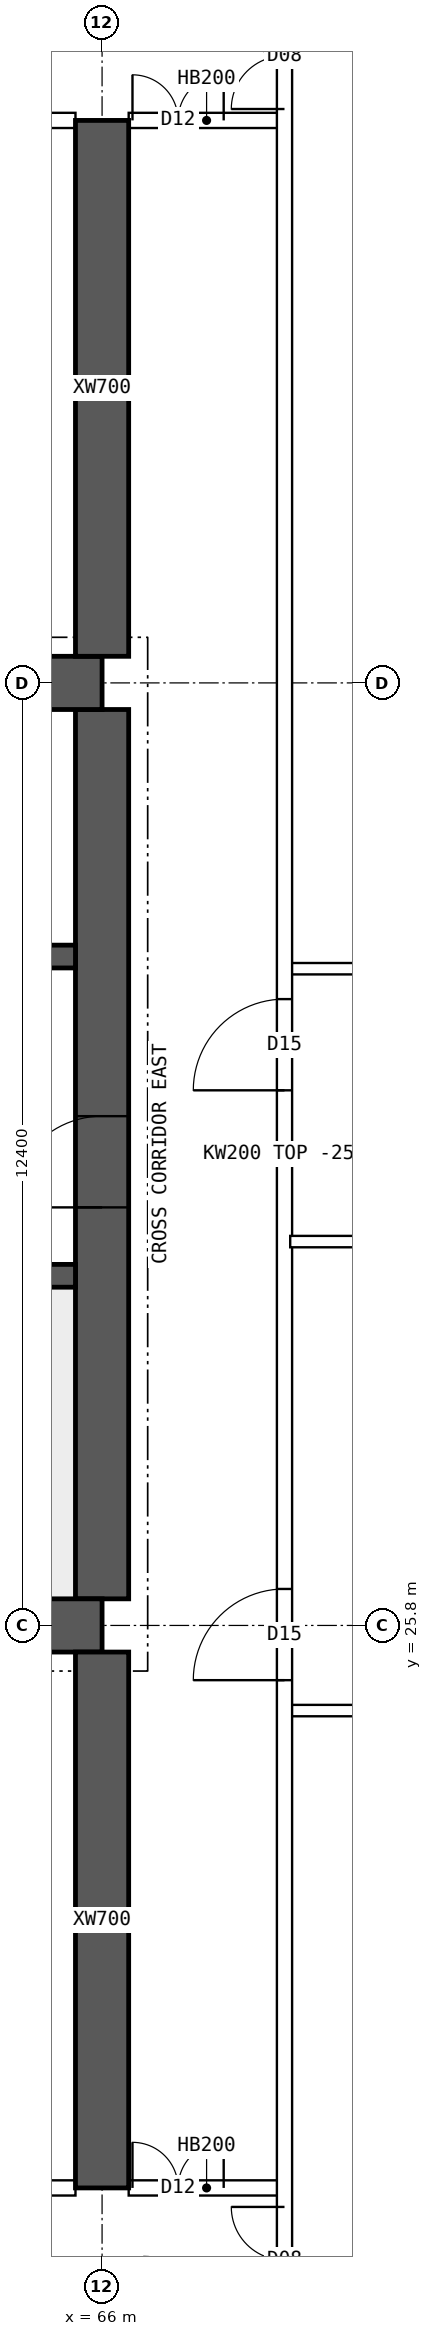
"""IFC4 building model, lengths in metres.
Left out: names, types, materials, properties, quantities, classifications, styles, units other than length and angle.
Written with IfcOpenShell. Run it as: python <this file> out.ifc"""

import sys

from ifc_helpers import new_model, si_unit, direction, frame, frame_2d, origin, place, context, subcontext, project, spatial, polyline, rectangle, outline, extrude, element, fill, save


model = new_model("IFC4")
c1 = context("Model", 3, precision=1e-05, world=origin(), true_north=direction((0.0, 1.0)))
c2 = subcontext(c1, "Body", "Model", "MODEL_VIEW")
j1 = project(units=[si_unit("LENGTHUNIT", "METRE"), si_unit("PLANEANGLEUNIT", "RADIAN")], contexts=[c1])
p1 = place(None, origin())
s1 = spatial("IfcSite", under=j1, at=p1, CompositionType="ELEMENT")
p2 = place(p1, origin())
s2 = spatial("IfcBuilding", under=s1, at=p2, CompositionType="ELEMENT")
p3 = place(p2, frame((0.0, 0.0, 231.55)))
s3 = spatial("IfcBuildingStorey", under=s2, at=p3, CompositionType="ELEMENT", Elevation=231.55)
for number, where, z_axis, x_axis in (
    (1, (18.0, 25.8, 0.0), (0.0, 0.0, 1.0), (1.0, 0.0, 0.0)),
    (2, (18.0, 38.2, 0.0), (0.0, 0.0, 1.0), (1.0, 0.0, 0.0)),
):
    element("IfcWall", number, at=place(p3, frame(where, z_axis=z_axis, x_axis=x_axis)), inside=s3, PredefinedType="SHEAR", context=c2, shape_type="SweptSolid", body=[
        extrude(rectangle(XDim=48.0, YDim=0.7, at=frame_2d((24.0, 0.0))), origin(), (0.0, 0.0, 1.0), 3.75),
    ])
p4 = place(p3, frame((66.0, 26.15, 0.0), z_axis=(0.0, 0.0, 1.0), x_axis=(0.0, 1.0, 0.0)))
e3 = element("IfcWall", 3, at=p4, inside=s3, PredefinedType="SHEAR", context=c2, shape_type="SweptSolid", body=[
    extrude(rectangle(XDim=11.7, YDim=0.7, at=frame_2d((5.85, 0.0))), origin(), (0.0, 0.0, 1.0), 3.75),
])
p5 = place(p4, frame((5.15, 0.0, 0.0)))
e4 = element("IfcOpeningElement", 4, at=p5, cuts=e3, PredefinedType="OPENING", context=c2, shape_type="SweptSolid", body=[
    extrude(rectangle(XDim=1.2, YDim=2.1, at=frame_2d((0.6, 1.05))), frame((0.0, 0.36, 0.0), z_axis=(0.0, -1.0, 0.0), x_axis=(1.0, 0.0, 0.0)), (0.0, 0.0, 1.0), 0.72),
])
p6 = place(p3, frame((18.35, 30.4, 0.0), z_axis=(0.0, 0.0, 1.0), x_axis=(1.0, 0.0, 0.0)))
e5 = element("IfcWall", 5, at=p6, inside=s3, PredefinedType="SHEAR", context=c2, shape_type="SweptSolid", body=[
    extrude(rectangle(XDim=47.3, YDim=0.3, at=frame_2d((23.65, 0.0))), origin(), (0.0, 0.0, 1.0), 3.75),
])
p7 = place(p6, frame((0.4, 0.0, 0.0)))
e6 = element("IfcOpeningElement", 6, at=p7, cuts=e5, PredefinedType="OPENING", context=c2, shape_type="SweptSolid", body=[
    extrude(rectangle(XDim=1.0, YDim=2.1, at=frame_2d((0.5, 1.05))), frame((0.0, 0.16, 0.0), z_axis=(0.0, -1.0, 0.0), x_axis=(1.0, 0.0, 0.0)), (0.0, 0.0, 1.0), 0.32),
])
p8 = place(p6, frame((45.9, 0.0, 0.0)))
e7 = element("IfcOpeningElement", 7, at=p8, cuts=e5, PredefinedType="OPENING", context=c2, shape_type="SweptSolid", body=[
    extrude(rectangle(XDim=1.0, YDim=2.1, at=frame_2d((0.5, 1.05))), frame((0.0, 0.16, 0.0), z_axis=(0.0, -1.0, 0.0), x_axis=(1.0, 0.0, 0.0)), (0.0, 0.0, 1.0), 0.32),
])
p9 = place(p6, frame((8.4, 0.0, 0.0)))
e8 = element("IfcOpeningElement", 8, at=p9, cuts=e5, PredefinedType="OPENING", context=c2, shape_type="SweptSolid", body=[
    extrude(rectangle(XDim=1.1, YDim=2.1, at=frame_2d((0.55, 1.05))), frame((0.0, 0.16, 0.0), z_axis=(0.0, -1.0, 0.0), x_axis=(1.0, 0.0, 0.0)), (0.0, 0.0, 1.0), 0.32),
])
p10 = place(p6, frame((11.0, 0.0, 0.0)))
e9 = element("IfcOpeningElement", 9, at=p10, cuts=e5, PredefinedType="OPENING", context=c2, shape_type="SweptSolid", body=[
    extrude(rectangle(XDim=1.1, YDim=2.1, at=frame_2d((0.55, 1.05))), frame((0.0, 0.16, 0.0), z_axis=(0.0, -1.0, 0.0), x_axis=(1.0, 0.0, 0.0)), (0.0, 0.0, 1.0), 0.32),
])
p11 = place(p6, frame((13.6, 0.0, 0.0)))
e10 = element("IfcOpeningElement", 10, at=p11, cuts=e5, PredefinedType="OPENING", context=c2, shape_type="SweptSolid", body=[
    extrude(rectangle(XDim=1.1, YDim=2.1, at=frame_2d((0.55, 1.05))), frame((0.0, 0.16, 0.0), z_axis=(0.0, -1.0, 0.0), x_axis=(1.0, 0.0, 0.0)), (0.0, 0.0, 1.0), 0.32),
])
p12 = place(p6, frame((16.2, 0.0, 0.0)))
e11 = element("IfcOpeningElement", 11, at=p12, cuts=e5, PredefinedType="OPENING", context=c2, shape_type="SweptSolid", body=[
    extrude(rectangle(XDim=1.1, YDim=2.1, at=frame_2d((0.55, 1.05))), frame((0.0, 0.16, 0.0), z_axis=(0.0, -1.0, 0.0), x_axis=(1.0, 0.0, 0.0)), (0.0, 0.0, 1.0), 0.32),
])
p13 = place(p6, frame((18.975, 0.0, 0.0)))
e12 = element("IfcOpeningElement", 12, at=p13, cuts=e5, PredefinedType="OPENING", context=c2, shape_type="SweptSolid", body=[
    extrude(rectangle(XDim=0.9, YDim=2.1, at=frame_2d((0.45, 1.05))), frame((0.0, 0.16, 0.0), z_axis=(0.0, -1.0, 0.0), x_axis=(1.0, 0.0, 0.0)), (0.0, 0.0, 1.0), 0.32),
])
p14 = place(p6, frame((24.475, 0.0, 0.0)))
e13 = element("IfcOpeningElement", 13, at=p14, cuts=e5, PredefinedType="OPENING", context=c2, shape_type="SweptSolid", body=[
    extrude(rectangle(XDim=0.9, YDim=2.1, at=frame_2d((0.45, 1.05))), frame((0.0, 0.16, 0.0), z_axis=(0.0, -1.0, 0.0), x_axis=(1.0, 0.0, 0.0)), (0.0, 0.0, 1.0), 0.32),
])
p15 = place(p6, frame((30.267, 0.0, 0.0)))
e14 = element("IfcOpeningElement", 14, at=p15, cuts=e5, PredefinedType="OPENING", context=c2, shape_type="SweptSolid", body=[
    extrude(rectangle(XDim=1.1, YDim=2.1, at=frame_2d((0.55, 1.05))), frame((0.0, 0.16, 0.0), z_axis=(0.0, -1.0, 0.0), x_axis=(1.0, 0.0, 0.0)), (0.0, 0.0, 1.0), 0.32),
])
p16 = place(p6, frame((33.8, 0.0, 0.0)))
e15 = element("IfcOpeningElement", 15, at=p16, cuts=e5, PredefinedType="OPENING", context=c2, shape_type="SweptSolid", body=[
    extrude(rectangle(XDim=1.1, YDim=2.1, at=frame_2d((0.55, 1.05))), frame((0.0, 0.16, 0.0), z_axis=(0.0, -1.0, 0.0), x_axis=(1.0, 0.0, 0.0)), (0.0, 0.0, 1.0), 0.32),
])
p17 = place(p6, frame((37.333, 0.0, 0.0)))
e16 = element("IfcOpeningElement", 16, at=p17, cuts=e5, PredefinedType="OPENING", context=c2, shape_type="SweptSolid", body=[
    extrude(rectangle(XDim=1.1, YDim=2.1, at=frame_2d((0.55, 1.05))), frame((0.0, 0.16, 0.0), z_axis=(0.0, -1.0, 0.0), x_axis=(1.0, 0.0, 0.0)), (0.0, 0.0, 1.0), 0.32),
])
p18 = place(p3, frame((18.35, 34.6, 0.0), z_axis=(0.0, 0.0, 1.0), x_axis=(1.0, 0.0, 0.0)))
e17 = element("IfcWall", 17, at=p18, inside=s3, PredefinedType="SHEAR", context=c2, shape_type="SweptSolid", body=[
    extrude(rectangle(XDim=47.3, YDim=0.3, at=frame_2d((23.65, 0.0))), origin(), (0.0, 0.0, 1.0), 3.75),
])
p19 = place(p18, frame((0.9, 0.0, 0.0)))
e18 = element("IfcOpeningElement", 18, at=p19, cuts=e17, PredefinedType="OPENING", context=c2, shape_type="SweptSolid", body=[
    extrude(rectangle(XDim=1.1, YDim=2.1, at=frame_2d((0.55, 1.05))), frame((0.0, 0.16, 0.0), z_axis=(0.0, -1.0, 0.0), x_axis=(1.0, 0.0, 0.0)), (0.0, 0.0, 1.0), 0.32),
])
p20 = place(p18, frame((45.3, 0.0, 0.0)))
e19 = element("IfcOpeningElement", 19, at=p20, cuts=e17, PredefinedType="OPENING", context=c2, shape_type="SweptSolid", body=[
    extrude(rectangle(XDim=1.1, YDim=2.1, at=frame_2d((0.55, 1.05))), frame((0.0, 0.16, 0.0), z_axis=(0.0, -1.0, 0.0), x_axis=(1.0, 0.0, 0.0)), (0.0, 0.0, 1.0), 0.32),
])
p21 = place(p18, frame((4.25, 0.0, 0.0)))
e20 = element("IfcOpeningElement", 20, at=p21, cuts=e17, PredefinedType="OPENING", context=c2, shape_type="SweptSolid", body=[
    extrude(rectangle(XDim=0.9, YDim=2.1, at=frame_2d((0.45, 1.05))), frame((0.0, 0.16, 0.0), z_axis=(0.0, -1.0, 0.0), x_axis=(1.0, 0.0, 0.0)), (0.0, 0.0, 1.0), 0.32),
])
p22 = place(p18, frame((42.15, 0.0, 0.0)))
e21 = element("IfcOpeningElement", 21, at=p22, cuts=e17, PredefinedType="OPENING", context=c2, shape_type="SweptSolid", body=[
    extrude(rectangle(XDim=0.9, YDim=2.1, at=frame_2d((0.45, 1.05))), frame((0.0, 0.16, 0.0), z_axis=(0.0, -1.0, 0.0), x_axis=(1.0, 0.0, 0.0)), (0.0, 0.0, 1.0), 0.32),
])
p23 = place(p18, frame((9.025, 0.0, 0.0)))
e22 = element("IfcOpeningElement", 22, at=p23, cuts=e17, PredefinedType="OPENING", context=c2, shape_type="SweptSolid", body=[
    extrude(rectangle(XDim=0.9, YDim=2.1, at=frame_2d((0.45, 1.05))), frame((0.0, 0.16, 0.0), z_axis=(0.0, -1.0, 0.0), x_axis=(1.0, 0.0, 0.0)), (0.0, 0.0, 1.0), 0.32),
])
p24 = place(p18, frame((12.999, 0.0, 0.0)))
e23 = element("IfcOpeningElement", 23, at=p24, cuts=e17, PredefinedType="OPENING", context=c2, shape_type="SweptSolid", body=[
    extrude(rectangle(XDim=0.9, YDim=2.1, at=frame_2d((0.45, 1.05))), frame((0.0, 0.16, 0.0), z_axis=(0.0, -1.0, 0.0), x_axis=(1.0, 0.0, 0.0)), (0.0, 0.0, 1.0), 0.32),
])
p25 = place(p18, frame((16.646, 0.0, 0.0)))
e24 = element("IfcOpeningElement", 24, at=p25, cuts=e17, PredefinedType="OPENING", context=c2, shape_type="SweptSolid", body=[
    extrude(rectangle(XDim=0.9, YDim=2.1, at=frame_2d((0.45, 1.05))), frame((0.0, 0.16, 0.0), z_axis=(0.0, -1.0, 0.0), x_axis=(1.0, 0.0, 0.0)), (0.0, 0.0, 1.0), 0.32),
])
p26 = place(p18, frame((20.405, 0.0, 0.0)))
e25 = element("IfcOpeningElement", 25, at=p26, cuts=e17, PredefinedType="OPENING", context=c2, shape_type="SweptSolid", body=[
    extrude(rectangle(XDim=0.9, YDim=2.1, at=frame_2d((0.45, 1.05))), frame((0.0, 0.16, 0.0), z_axis=(0.0, -1.0, 0.0), x_axis=(1.0, 0.0, 0.0)), (0.0, 0.0, 1.0), 0.32),
])
p27 = place(p18, frame((24.811, 0.0, 0.0)))
e26 = element("IfcOpeningElement", 26, at=p27, cuts=e17, PredefinedType="OPENING", context=c2, shape_type="SweptSolid", body=[
    extrude(rectangle(XDim=0.9, YDim=2.1, at=frame_2d((0.45, 1.05))), frame((0.0, 0.16, 0.0), z_axis=(0.0, -1.0, 0.0), x_axis=(1.0, 0.0, 0.0)), (0.0, 0.0, 1.0), 0.32),
])
p28 = place(p18, frame((27.608, 0.0, 0.0)))
e27 = element("IfcOpeningElement", 27, at=p28, cuts=e17, PredefinedType="OPENING", context=c2, shape_type="SweptSolid", body=[
    extrude(rectangle(XDim=0.9, YDim=2.1, at=frame_2d((0.45, 1.05))), frame((0.0, 0.16, 0.0), z_axis=(0.0, -1.0, 0.0), x_axis=(1.0, 0.0, 0.0)), (0.0, 0.0, 1.0), 0.32),
])
p29 = place(p18, frame((33.729, 0.0, 0.0)))
e28 = element("IfcOpeningElement", 28, at=p29, cuts=e17, PredefinedType="OPENING", context=c2, shape_type="SweptSolid", body=[
    extrude(rectangle(XDim=0.9, YDim=2.1, at=frame_2d((0.45, 1.05))), frame((0.0, 0.16, 0.0), z_axis=(0.0, -1.0, 0.0), x_axis=(1.0, 0.0, 0.0)), (0.0, 0.0, 1.0), 0.32),
])
for number, where, z_axis, x_axis in (
    (29, (66.0, 18.4, 0.0), (0.0, 0.0, 1.0), (0.0, 1.0, 0.0)),
    (30, (66.0, 38.55, 0.0), (0.0, 0.0, 1.0), (0.0, 1.0, 0.0)),
):
    element("IfcWall", number, at=place(p3, frame(where, z_axis=z_axis, x_axis=x_axis)), inside=s3, PredefinedType="SHEAR", context=c2, shape_type="SweptSolid", body=[
        extrude(rectangle(XDim=7.05, YDim=0.7, at=frame_2d((3.525, 0.0))), origin(), (0.0, 0.0, 1.0), 3.75),
    ])
p30 = place(p3, frame((60.35, 18.4, 0.0), z_axis=(0.0, 0.0, 1.0), x_axis=(1.0, 0.0, 0.0)))
e31 = element("IfcWall", 31, at=p30, inside=s3, PredefinedType="SOLIDWALL", context=c2, shape_type="SweptSolid", body=[
    extrude(rectangle(XDim=5.3, YDim=0.2, at=frame_2d((2.65, 0.0))), origin(), (0.0, 0.0, 1.0), 3.5),
])
p31 = place(p30, frame((0.15, 0.0, 0.0)))
e32 = element("IfcOpeningElement", 32, at=p31, cuts=e31, PredefinedType="OPENING", context=c2, shape_type="SweptSolid", body=[
    extrude(rectangle(XDim=0.9, YDim=2.1, at=frame_2d((0.45, 1.05))), frame((0.0, 0.11, 0.0), z_axis=(0.0, -1.0, 0.0), x_axis=(1.0, 0.0, 0.0)), (0.0, 0.0, 1.0), 0.22),
])
p32 = place(p30, frame((2.15, 0.0, 0.0)))
e33 = element("IfcOpeningElement", 33, at=p32, cuts=e31, PredefinedType="OPENING", context=c2, shape_type="SweptSolid", body=[
    extrude(rectangle(XDim=0.9, YDim=2.1, at=frame_2d((0.45, 1.05))), frame((0.0, 0.11, 0.0), z_axis=(0.0, -1.0, 0.0), x_axis=(1.0, 0.0, 0.0)), (0.0, 0.0, 1.0), 0.22),
])
p33 = place(p3, frame((66.35, 18.4, 0.0), z_axis=(0.0, 0.0, 1.0), x_axis=(1.0, 0.0, 0.0)))
e34 = element("IfcWall", 34, at=p33, inside=s3, PredefinedType="SOLIDWALL", context=c2, shape_type="SweptSolid", body=[
    extrude(rectangle(XDim=2.05, YDim=0.2, at=frame_2d((1.025, 0.0))), origin(), (0.0, 0.0, 1.0), 3.5),
])
p34 = place(p33, frame((0.05, 0.0, 0.0)))
e35 = element("IfcOpeningElement", 35, at=p34, cuts=e34, PredefinedType="OPENING", context=c2, shape_type="SweptSolid", body=[
    extrude(rectangle(XDim=1.2, YDim=2.1, at=frame_2d((0.6, 1.05))), frame((0.0, 0.11, 0.0), z_axis=(0.0, -1.0, 0.0), x_axis=(1.0, 0.0, 0.0)), (0.0, 0.0, 1.0), 0.22),
])
p35 = place(p3, frame((60.35, 45.6, 0.0), z_axis=(0.0, 0.0, 1.0), x_axis=(1.0, 0.0, 0.0)))
e36 = element("IfcWall", 36, at=p35, inside=s3, PredefinedType="SOLIDWALL", context=c2, shape_type="SweptSolid", body=[
    extrude(rectangle(XDim=5.3, YDim=0.2, at=frame_2d((2.65, 0.0))), origin(), (0.0, 0.0, 1.0), 3.5),
])
p36 = place(p35, frame((0.15, 0.0, 0.0)))
e37 = element("IfcOpeningElement", 37, at=p36, cuts=e36, PredefinedType="OPENING", context=c2, shape_type="SweptSolid", body=[
    extrude(rectangle(XDim=0.9, YDim=2.1, at=frame_2d((0.45, 1.05))), frame((0.0, 0.11, 0.0), z_axis=(0.0, -1.0, 0.0), x_axis=(1.0, 0.0, 0.0)), (0.0, 0.0, 1.0), 0.22),
])
p37 = place(p35, frame((2.52, 0.0, 0.0)))
e38 = element("IfcOpeningElement", 38, at=p37, cuts=e36, PredefinedType="OPENING", context=c2, shape_type="SweptSolid", body=[
    extrude(rectangle(XDim=0.9, YDim=2.1, at=frame_2d((0.45, 1.05))), frame((0.0, 0.11, 0.0), z_axis=(0.0, -1.0, 0.0), x_axis=(1.0, 0.0, 0.0)), (0.0, 0.0, 1.0), 0.22),
])
p38 = place(p3, frame((66.35, 45.6, 0.0), z_axis=(0.0, 0.0, 1.0), x_axis=(1.0, 0.0, 0.0)))
e39 = element("IfcWall", 39, at=p38, inside=s3, PredefinedType="SOLIDWALL", context=c2, shape_type="SweptSolid", body=[
    extrude(rectangle(XDim=2.05, YDim=0.2, at=frame_2d((1.025, 0.0))), origin(), (0.0, 0.0, 1.0), 3.5),
])
p39 = place(p38, frame((0.05, 0.0, 0.0)))
e40 = element("IfcOpeningElement", 40, at=p39, cuts=e39, PredefinedType="OPENING", context=c2, shape_type="SweptSolid", body=[
    extrude(rectangle(XDim=1.2, YDim=2.1, at=frame_2d((0.6, 1.05))), frame((0.0, 0.11, 0.0), z_axis=(0.0, -1.0, 0.0), x_axis=(1.0, 0.0, 0.0)), (0.0, 0.0, 1.0), 0.22),
])
p40 = place(p3, frame((68.475, 30.85, 0.0), z_axis=(0.0, 0.0, 1.0), x_axis=(1.0, 0.0, 0.0)))
e41 = element("IfcWall", 41, at=p40, inside=s3, PredefinedType="PARTITIONING", context=c2, shape_type="SweptSolid", body=[
    extrude(outline(polyline([(0.0, 0.0), (6.82, 0.0), (6.82, 3.5), (3.827, 3.5), (3.825, 3.05), (3.227, 3.05), (3.225, 3.5), (0.0, 3.5), (0.0, 0.0)])), frame((0.0, 0.075, 0.0), z_axis=(0.0, -1.0, 0.0), x_axis=(1.0, 0.0, 0.0)), (0.0, 0.0, 1.0), 0.15),
])
p41 = place(p3, frame((68.4, 11.646, 0.0), z_axis=(0.0, 0.0, 1.0), x_axis=(0.0, 1.0, 0.0)))
e42 = element("IfcWall", 42, at=p41, inside=s3, PredefinedType="SOLIDWALL", context=c2, shape_type="SweptSolid", body=[
    extrude(rectangle(XDim=40.708, YDim=0.2, at=frame_2d((20.354, 0.0))), origin(), (0.0, 0.0, 1.0), 3.5),
])
p42 = place(p41, frame((13.434, 0.0, 0.0)))
e43 = element("IfcOpeningElement", 43, at=p42, cuts=e42, PredefinedType="OPENING", context=c2, shape_type="SweptSolid", body=[
    extrude(rectangle(XDim=1.2, YDim=2.1, at=frame_2d((0.6, 1.05))), frame((0.0, 0.11, 0.0), z_axis=(0.0, -1.0, 0.0), x_axis=(1.0, 0.0, 0.0)), (0.0, 0.0, 1.0), 0.22),
])
p43 = place(p41, frame((21.194, 0.0, 0.0)))
e44 = element("IfcOpeningElement", 44, at=p43, cuts=e42, PredefinedType="OPENING", context=c2, shape_type="SweptSolid", body=[
    extrude(rectangle(XDim=1.2, YDim=2.1, at=frame_2d((0.6, 1.05))), frame((0.0, 0.11, 0.0), z_axis=(0.0, -1.0, 0.0), x_axis=(1.0, 0.0, 0.0)), (0.0, 0.0, 1.0), 0.22),
])
p44 = place(p41, frame((5.104, 0.0, 0.0)))
e45 = element("IfcOpeningElement", 45, at=p44, cuts=e42, PredefinedType="OPENING", context=c2, shape_type="SweptSolid", body=[
    extrude(rectangle(XDim=1.4, YDim=2.1, at=frame_2d((0.7, 1.05))), frame((0.0, 0.11, 0.0), z_axis=(0.0, -1.0, 0.0), x_axis=(1.0, 0.0, 0.0)), (0.0, 0.0, 1.0), 0.22),
])
p45 = place(p41, frame((34.104, 0.0, 0.0)))
e46 = element("IfcOpeningElement", 46, at=p45, cuts=e42, PredefinedType="OPENING", context=c2, shape_type="SweptSolid", body=[
    extrude(rectangle(XDim=1.4, YDim=2.1, at=frame_2d((0.7, 1.05))), frame((0.0, 0.11, 0.0), z_axis=(0.0, -1.0, 0.0), x_axis=(1.0, 0.0, 0.0)), (0.0, 0.0, 1.0), 0.22),
])
p46 = place(p3, frame((68.475, 24.68, 0.0), z_axis=(0.0, 0.0, 1.0), x_axis=(1.0, 0.0, 0.0)))
e47 = element("IfcWall", 47, at=p46, inside=s3, PredefinedType="PARTITIONING", context=c2, shape_type="SweptSolid", body=[
    extrude(rectangle(XDim=6.82, YDim=0.15, at=frame_2d((3.41, 0.0))), origin(), (0.0, 0.0, 1.0), 3.5),
])
p47 = place(p3, frame((68.475, 34.44, 0.0), z_axis=(0.0, 0.0, 1.0), x_axis=(1.0, 0.0, 0.0)))
e48 = element("IfcWall", 48, at=p47, inside=s3, PredefinedType="PARTITIONING", context=c2, shape_type="SweptSolid", body=[
    extrude(outline(polyline([(0.0, 0.0), (6.82, 0.0), (6.82, 3.5), (3.827, 3.5), (3.825, 3.05), (3.227, 3.05), (3.225, 3.5), (0.0, 3.5), (0.0, 0.0)])), frame((0.0, 0.075, 0.0), z_axis=(0.0, -1.0, 0.0), x_axis=(1.0, 0.0, 0.0)), (0.0, 0.0, 1.0), 0.15),
])
p48 = place(p5, origin())
e49 = element("IfcDoor", 49, at=p48, inside=s3, OperationType="SINGLE_SWING_LEFT", PredefinedType="DOOR", context=c2, shape_type="SweptSolid", body=[
    extrude(rectangle(XDim=1.2, YDim=2.1, at=frame_2d((0.6, 1.05))), frame((0.0, 0.025, 0.0), z_axis=(0.0, -1.0, 0.0), x_axis=(1.0, 0.0, 0.0)), (0.0, 0.0, 1.0), 0.05),
])
fill(e4, e49)
p49 = place(p34, origin())
e50 = element("IfcDoor", 50, at=p49, inside=s3, OperationType="DOUBLE_DOOR_SINGLE_SWING", PredefinedType="DOOR", context=c2, shape_type="SweptSolid", body=[
    extrude(rectangle(XDim=1.2, YDim=2.1, at=frame_2d((0.6, 1.05))), frame((0.0, 0.025, 0.0), z_axis=(0.0, -1.0, 0.0), x_axis=(1.0, 0.0, 0.0)), (0.0, 0.0, 1.0), 0.05),
])
fill(e35, e50)
p50 = place(p39, origin())
e51 = element("IfcDoor", 51, at=p50, inside=s3, OperationType="DOUBLE_DOOR_SINGLE_SWING", PredefinedType="DOOR", context=c2, shape_type="SweptSolid", body=[
    extrude(rectangle(XDim=1.2, YDim=2.1, at=frame_2d((0.6, 1.05))), frame((0.0, 0.025, 0.0), z_axis=(0.0, -1.0, 0.0), x_axis=(1.0, 0.0, 0.0)), (0.0, 0.0, 1.0), 0.05),
])
fill(e40, e51)
p51 = place(p42, origin())
e52 = element("IfcDoor", 52, at=p51, inside=s3, OperationType="SINGLE_SWING_LEFT", PredefinedType="DOOR", context=c2, shape_type="SweptSolid", body=[
    extrude(rectangle(XDim=1.2, YDim=2.1, at=frame_2d((0.6, 1.05))), frame((0.0, 0.025, 0.0), z_axis=(0.0, -1.0, 0.0), x_axis=(1.0, 0.0, 0.0)), (0.0, 0.0, 1.0), 0.05),
])
fill(e43, e52)
p52 = place(p43, origin())
e53 = element("IfcDoor", 53, at=p52, inside=s3, OperationType="SINGLE_SWING_LEFT", PredefinedType="DOOR", context=c2, shape_type="SweptSolid", body=[
    extrude(rectangle(XDim=1.2, YDim=2.1, at=frame_2d((0.6, 1.05))), frame((0.0, 0.025, 0.0), z_axis=(0.0, -1.0, 0.0), x_axis=(1.0, 0.0, 0.0)), (0.0, 0.0, 1.0), 0.05),
])
fill(e44, e53)
p53 = place(p44, origin())
e54 = element("IfcDoor", 54, at=p53, inside=s3, OperationType="DOUBLE_DOOR_SINGLE_SWING", PredefinedType="DOOR", context=c2, shape_type="SweptSolid", body=[
    extrude(rectangle(XDim=1.4, YDim=2.1, at=frame_2d((0.7, 1.05))), frame((0.0, 0.025, 0.0), z_axis=(0.0, -1.0, 0.0), x_axis=(1.0, 0.0, 0.0)), (0.0, 0.0, 1.0), 0.05),
])
fill(e45, e54)
p54 = place(p45, origin())
e55 = element("IfcDoor", 55, at=p54, inside=s3, OperationType="DOUBLE_DOOR_SINGLE_SWING", PredefinedType="DOOR", context=c2, shape_type="SweptSolid", body=[
    extrude(rectangle(XDim=1.4, YDim=2.1, at=frame_2d((0.7, 1.05))), frame((0.0, 0.025, 0.0), z_axis=(0.0, -1.0, 0.0), x_axis=(1.0, 0.0, 0.0)), (0.0, 0.0, 1.0), 0.05),
])
fill(e46, e55)
save(model, sys.argv[1])
